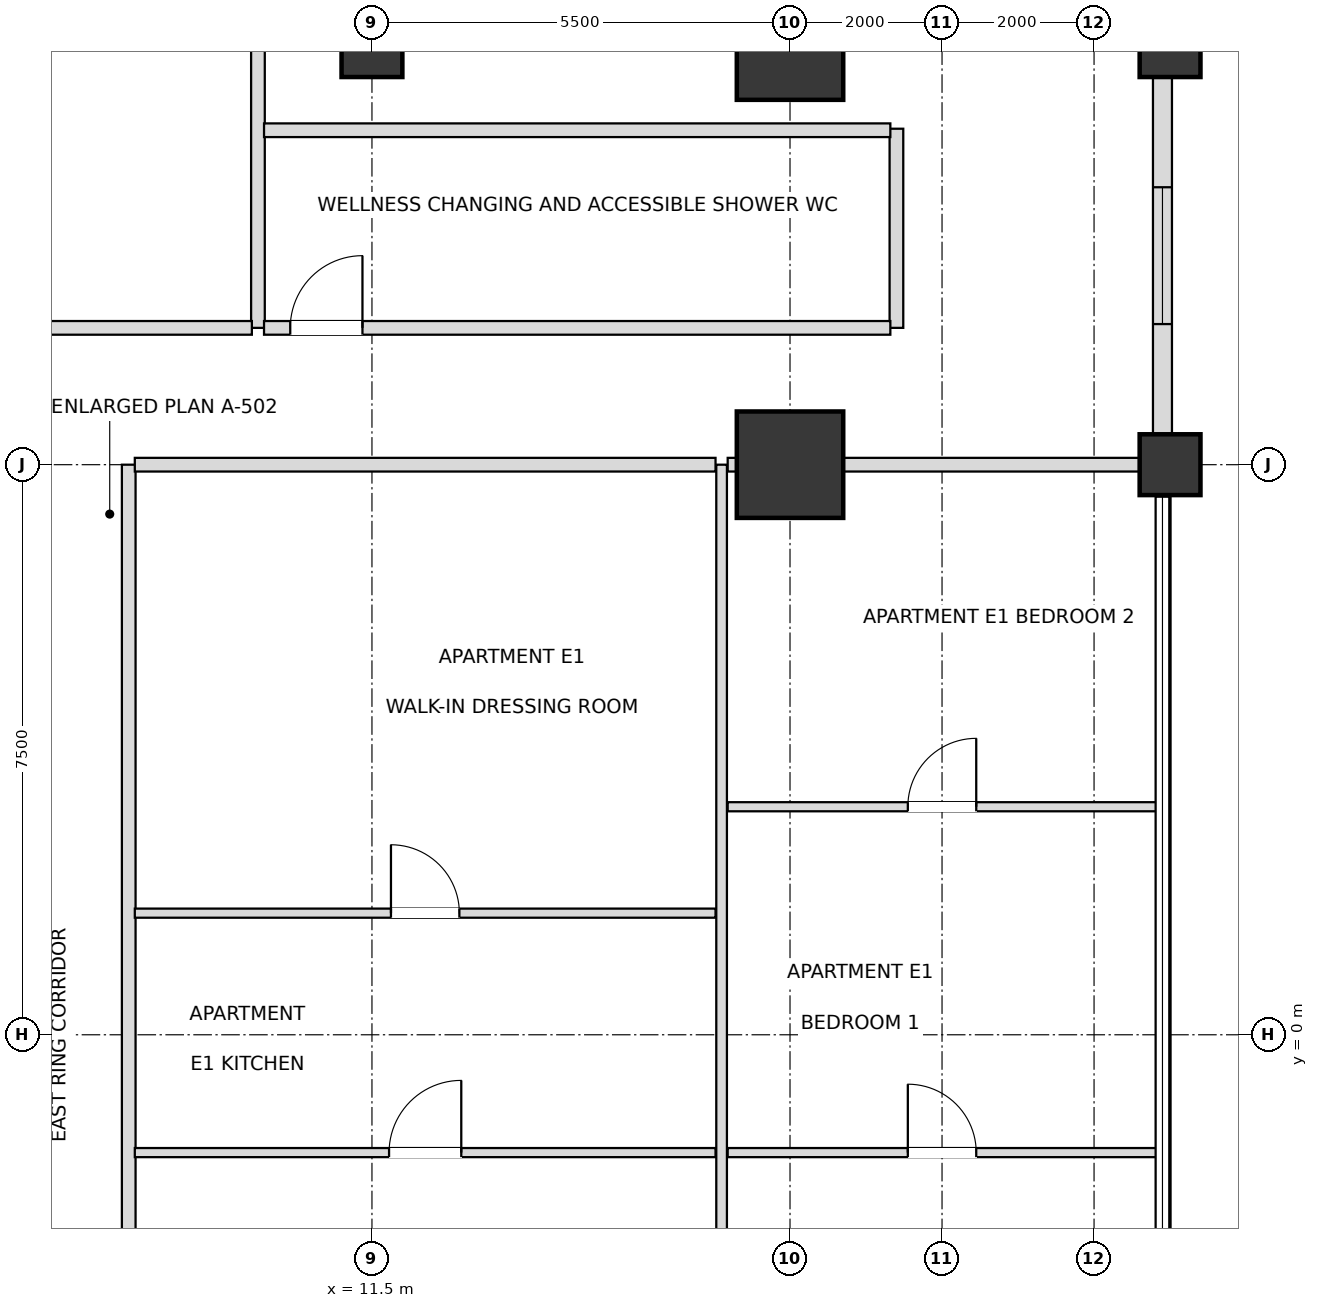
"""IFC4 building model, lengths in metres.
Left out: names, types, materials, properties, quantities, classifications, styles, units other than length and angle.
Written with IfcOpenShell. Run it as: python <this file> out.ifc"""

import sys

from ifc_helpers import new_model, si_unit, direction, frame, frame_2d, origin, origin_2d, place, context, subcontext, project, spatial, rectangle, extrude, element, fill, save


model = new_model("IFC4")
c1 = context("Model", 3, precision=1e-05, world=origin(), true_north=direction((0.0, 1.0)))
c2 = subcontext(c1, "Body", "Model", "MODEL_VIEW")
j1 = project(units=[si_unit("LENGTHUNIT", "METRE"), si_unit("PLANEANGLEUNIT", "RADIAN")], contexts=[c1])
p1 = place(None, origin())
s1 = spatial("IfcSite", under=j1, at=p1, CompositionType="ELEMENT")
p2 = place(p1, origin())
s2 = spatial("IfcBuilding", under=s1, at=p2, CompositionType="ELEMENT")
p3 = place(p2, frame((0.0, 0.0, 54.0)))
s3 = spatial("IfcBuildingStorey", under=s2, at=p3, CompositionType="ELEMENT", Elevation=54.0)
for number, where, z_axis, x_axis in (
    (1, (17.0, 7.5, 0.0), (0.0, 0.0, 1.0), (1.0, 0.0, 0.0)),
    (2, (17.0, 13.0, 0.0), (0.0, 0.0, 1.0), (1.0, 0.0, 0.0)),
):
    element("IfcColumn", number, at=place(p3, frame(where, z_axis=z_axis, x_axis=x_axis)), inside=s3, PredefinedType="USERDEFINED", context=c2, shape_type="SweptSolid", body=[
        extrude(rectangle(XDim=1.4, YDim=1.4, at=origin_2d()), origin(), (0.0, 0.0, 1.0), 3.6),
    ])
for number, where, z_axis, x_axis in (
    (3, (11.5, 13.0, 0.0), (0.0, 0.0, 1.0), (1.0, 0.0, 0.0)),
    (4, (22.0, 7.5, 0.0), (0.0, 0.0, 1.0), (1.0, 0.0, 0.0)),
    (5, (22.0, 13.0, 0.0), (0.0, 0.0, 1.0), (1.0, 0.0, 0.0)),
):
    element("IfcColumn", number, at=place(p3, frame(where, z_axis=z_axis, x_axis=x_axis)), inside=s3, PredefinedType="COLUMN", context=c2, shape_type="SweptSolid", body=[
        extrude(rectangle(XDim=0.8, YDim=0.8, at=origin_2d()), origin(), (0.0, 0.0, 1.0), 3.6),
    ])
p4 = place(p3, frame((21.9, 7.895, 0.0), z_axis=(0.0, 0.0, 1.0), x_axis=(0.0, 1.0, 0.0)))
e6 = element("IfcWall", 6, at=p4, inside=s3, PredefinedType="SOLIDWALL", context=c2, shape_type="SweptSolid", body=[
    extrude(rectangle(XDim=4.71, YDim=0.25, at=frame_2d((2.355, 0.0))), origin(), (0.0, 0.0, 1.0), 2.736),
])
p5 = place(p4, frame((1.455, 0.0, 0.72)))
e7 = element("IfcOpeningElement", 7, at=p5, cuts=e6, PredefinedType="OPENING", context=c2, shape_type="SweptSolid", body=[
    extrude(rectangle(XDim=1.8, YDim=1.68, at=frame_2d((0.9, 0.84))), frame((0.0, 0.135, 0.0), z_axis=(0.0, -1.0, 0.0), x_axis=(1.0, 0.0, 0.0)), (0.0, 0.0, 1.0), 0.27),
])
p6 = place(p3, frame((8.3, -7.5, 0.0), z_axis=(0.0, 0.0, 1.0), x_axis=(0.0, 1.0, 0.0)))
e8 = element("IfcWall", 8, at=p6, inside=s3, PredefinedType="PARTITIONING", context=c2, shape_type="SweptSolid", body=[
    extrude(rectangle(XDim=15.0, YDim=0.18, at=frame_2d((7.5, 0.0))), origin(), (0.0, 0.0, 1.0), 3.38),
])
p7 = place(p6, frame((3.475, 0.0, 0.0)))
e9 = element("IfcOpeningElement", 9, at=p7, cuts=e8, PredefinedType="OPENING", context=c2, shape_type="SweptSolid", body=[
    extrude(rectangle(XDim=0.95, YDim=2.15, at=frame_2d((0.475, 1.075))), frame((0.0, 0.1, 0.0), z_axis=(0.0, -1.0, 0.0), x_axis=(1.0, 0.0, 0.0)), (0.0, 0.0, 1.0), 0.2),
])
p8 = place(p3, frame((10.0, 9.3, 0.0), z_axis=(0.0, 0.0, 1.0), x_axis=(0.0, 1.0, 0.0)))
e10 = element("IfcWall", 10, at=p8, inside=s3, PredefinedType="PARTITIONING", context=c2, shape_type="SweptSolid", body=[
    extrude(rectangle(XDim=15.6, YDim=0.18, at=frame_2d((7.8, 0.0))), origin(), (0.0, 0.0, 1.0), 2.816),
])
p9 = place(p8, frame((8.635, 0.0, 0.0)))
e11 = element("IfcOpeningElement", 11, at=p9, cuts=e10, PredefinedType="OPENING", context=c2, shape_type="SweptSolid", body=[
    extrude(rectangle(XDim=0.95, YDim=2.15, at=frame_2d((0.475, 1.075))), frame((0.0, 0.1, 0.0), z_axis=(0.0, -1.0, 0.0), x_axis=(1.0, 0.0, 0.0)), (0.0, 0.0, 1.0), 0.2),
])
p10 = place(p3, frame((16.1, -7.5, 0.0), z_axis=(0.0, 0.0, 1.0), x_axis=(0.0, 1.0, 0.0)))
e12 = element("IfcWall", 12, at=p10, inside=s3, PredefinedType="PARTITIONING", context=c2, shape_type="SweptSolid", body=[
    extrude(rectangle(XDim=15.0, YDim=0.14, at=frame_2d((7.5, 0.0))), origin(), (0.0, 0.0, 1.0), 3.38),
])
p11 = place(p10, frame((3.475, 0.0, 0.0)))
e13 = element("IfcOpeningElement", 13, at=p11, cuts=e12, PredefinedType="OPENING", context=c2, shape_type="SweptSolid", body=[
    extrude(rectangle(XDim=0.95, YDim=2.1, at=frame_2d((0.475, 1.05))), frame((0.0, 0.08, 0.0), z_axis=(0.0, -1.0, 0.0), x_axis=(1.0, 0.0, 0.0)), (0.0, 0.0, 1.0), 0.16),
])
p12 = place(p3, frame((18.4, 9.3, 0.0), z_axis=(0.0, 0.0, 1.0), x_axis=(0.0, 1.0, 0.0)))
e14 = element("IfcWall", 14, at=p12, inside=s3, PredefinedType="PARTITIONING", context=c2, shape_type="SweptSolid", body=[
    extrude(rectangle(XDim=2.62, YDim=0.18, at=frame_2d((1.31, 0.0))), origin(), (0.0, 0.0, 1.0), 3.38),
])
p13 = place(p3, frame((8.38, -1.55, 0.0), z_axis=(0.0, 0.0, 1.0), x_axis=(1.0, 0.0, 0.0)))
e15 = element("IfcWall", 15, at=p13, inside=s3, PredefinedType="PARTITIONING", context=c2, shape_type="SweptSolid", body=[
    extrude(rectangle(XDim=7.64, YDim=0.12, at=frame_2d((3.82, 0.0))), origin(), (0.0, 0.0, 1.0), 2.948),
])
p14 = place(p13, frame((3.345, 0.0, 0.0)))
e16 = element("IfcOpeningElement", 16, at=p14, cuts=e15, PredefinedType="OPENING", context=c2, shape_type="SweptSolid", body=[
    extrude(rectangle(XDim=0.95, YDim=2.1, at=frame_2d((0.475, 1.05))), frame((0.0, 0.07, 0.0), z_axis=(0.0, -1.0, 0.0), x_axis=(1.0, 0.0, 0.0)), (0.0, 0.0, 1.0), 0.14),
])
p15 = place(p3, frame((16.18, -1.55, 0.0), z_axis=(0.0, 0.0, 1.0), x_axis=(1.0, 0.0, 0.0)))
e17 = element("IfcWall", 17, at=p15, inside=s3, PredefinedType="PARTITIONING", context=c2, shape_type="SweptSolid", body=[
    extrude(rectangle(XDim=5.64, YDim=0.12, at=frame_2d((2.82, 0.0))), origin(), (0.0, 0.0, 1.0), 2.816),
])
p16 = place(p15, frame((2.37, 0.0, 0.0)))
e18 = element("IfcOpeningElement", 18, at=p16, cuts=e17, PredefinedType="OPENING", context=c2, shape_type="SweptSolid", body=[
    extrude(rectangle(XDim=0.9, YDim=2.1, at=frame_2d((0.45, 1.05))), frame((0.0, 0.07, 0.0), z_axis=(0.0, -1.0, 0.0), x_axis=(1.0, 0.0, 0.0)), (0.0, 0.0, 1.0), 0.14),
])
p17 = place(p3, frame((8.38, 1.6, 0.0), z_axis=(0.0, 0.0, 1.0), x_axis=(1.0, 0.0, 0.0)))
e19 = element("IfcWall", 19, at=p17, inside=s3, PredefinedType="PARTITIONING", context=c2, shape_type="SweptSolid", body=[
    extrude(rectangle(XDim=7.64, YDim=0.12, at=frame_2d((3.82, 0.0))), origin(), (0.0, 0.0, 1.0), 2.948),
])
p18 = place(p17, frame((3.37, 0.0, 0.0)))
e20 = element("IfcOpeningElement", 20, at=p18, cuts=e19, PredefinedType="OPENING", context=c2, shape_type="SweptSolid", body=[
    extrude(rectangle(XDim=0.9, YDim=2.1, at=frame_2d((0.45, 1.05))), frame((0.0, 0.07, 0.0), z_axis=(0.0, -1.0, 0.0), x_axis=(1.0, 0.0, 0.0)), (0.0, 0.0, 1.0), 0.14),
])
p19 = place(p3, frame((16.18, 3.0, 0.0), z_axis=(0.0, 0.0, 1.0), x_axis=(1.0, 0.0, 0.0)))
e21 = element("IfcWall", 21, at=p19, inside=s3, PredefinedType="PARTITIONING", context=c2, shape_type="SweptSolid", body=[
    extrude(rectangle(XDim=5.64, YDim=0.12, at=frame_2d((2.82, 0.0))), origin(), (0.0, 0.0, 1.0), 2.816),
])
p20 = place(p19, frame((2.37, 0.0, 0.0)))
e22 = element("IfcOpeningElement", 22, at=p20, cuts=e21, PredefinedType="OPENING", context=c2, shape_type="SweptSolid", body=[
    extrude(rectangle(XDim=0.9, YDim=2.1, at=frame_2d((0.45, 1.05))), frame((0.0, 0.07, 0.0), z_axis=(0.0, -1.0, 0.0), x_axis=(1.0, 0.0, 0.0)), (0.0, 0.0, 1.0), 0.14),
])
p21 = place(p3, frame((8.38, 7.5, 0.0), z_axis=(0.0, 0.0, 1.0), x_axis=(1.0, 0.0, 0.0)))
e23 = element("IfcWall", 23, at=p21, inside=s3, PredefinedType="PARTITIONING", context=c2, shape_type="SweptSolid", body=[
    extrude(rectangle(XDim=7.64, YDim=0.18, at=frame_2d((3.82, 0.0))), origin(), (0.0, 0.0, 1.0), 2.816),
])
p22 = place(p3, frame((16.18, 7.5, 0.0), z_axis=(0.0, 0.0, 1.0), x_axis=(1.0, 0.0, 0.0)))
e24 = element("IfcWall", 24, at=p22, inside=s3, PredefinedType="PARTITIONING", context=c2, shape_type="SweptSolid", body=[
    extrude(rectangle(XDim=5.72, YDim=0.18, at=frame_2d((2.86, 0.0))), origin(), (0.0, 0.0, 1.0), 2.816),
])
p23 = place(p3, frame((-2.87, 9.3, 0.0), z_axis=(0.0, 0.0, 1.0), x_axis=(1.0, 0.0, 0.0)))
e25 = element("IfcWall", 25, at=p23, inside=s3, PredefinedType="PARTITIONING", context=c2, shape_type="SweptSolid", body=[
    extrude(rectangle(XDim=12.79, YDim=0.18, at=frame_2d((6.395, 0.0))), origin(), (0.0, 0.0, 1.0), 2.816),
])
p24 = place(p23, frame((5.925, 0.0, 0.0)))
e26 = element("IfcOpeningElement", 26, at=p24, cuts=e25, PredefinedType="OPENING", context=c2, shape_type="SweptSolid", body=[
    extrude(rectangle(XDim=0.95, YDim=2.15, at=frame_2d((0.475, 1.075))), frame((0.0, 0.1, 0.0), z_axis=(0.0, -1.0, 0.0), x_axis=(1.0, 0.0, 0.0)), (0.0, 0.0, 1.0), 0.2),
])
p25 = place(p3, frame((10.08, 9.3, 0.0), z_axis=(0.0, 0.0, 1.0), x_axis=(1.0, 0.0, 0.0)))
e27 = element("IfcWall", 27, at=p25, inside=s3, PredefinedType="PARTITIONING", context=c2, shape_type="SweptSolid", body=[
    extrude(rectangle(XDim=8.24, YDim=0.18, at=frame_2d((4.12, 0.0))), origin(), (0.0, 0.0, 1.0), 2.816),
])
p26 = place(p25, frame((0.345, 0.0, 0.0)))
e28 = element("IfcOpeningElement", 28, at=p26, cuts=e27, PredefinedType="OPENING", context=c2, shape_type="SweptSolid", body=[
    extrude(rectangle(XDim=0.95, YDim=2.15, at=frame_2d((0.475, 1.075))), frame((0.0, 0.1, 0.0), z_axis=(0.0, -1.0, 0.0), x_axis=(1.0, 0.0, 0.0)), (0.0, 0.0, 1.0), 0.2),
])
p27 = place(p3, frame((10.08, 11.9, 0.0), z_axis=(0.0, 0.0, 1.0), x_axis=(1.0, 0.0, 0.0)))
e29 = element("IfcWall", 29, at=p27, inside=s3, PredefinedType="PARTITIONING", context=c2, shape_type="SweptSolid", body=[
    extrude(rectangle(XDim=8.24, YDim=0.18, at=frame_2d((4.12, 0.0))), origin(), (0.0, 0.0, 1.0), 2.816),
])
p28 = place(p5, origin())
e30 = element("IfcWindow", 30, at=p28, inside=s3, PartitioningType="SINGLE_PANEL", PredefinedType="WINDOW", context=c2, shape_type="SweptSolid", body=[
    extrude(rectangle(XDim=1.8, YDim=1.68, at=frame_2d((0.9, 0.84))), frame((0.0, 0.03, 0.0), z_axis=(0.0, -1.0, 0.0), x_axis=(1.0, 0.0, 0.0)), (0.0, 0.0, 1.0), 0.06),
])
fill(e7, e30)
p29 = place(p26, origin())
e31 = element("IfcDoor", 31, at=p29, inside=s3, OperationType="SINGLE_SWING_RIGHT", PredefinedType="DOOR", context=c2, shape_type="SweptSolid", body=[
    extrude(rectangle(XDim=0.95, YDim=2.15, at=frame_2d((0.475, 1.075))), frame((0.0, 0.025, 0.0), z_axis=(0.0, -1.0, 0.0), x_axis=(1.0, 0.0, 0.0)), (0.0, 0.0, 1.0), 0.05),
])
fill(e28, e31)
p30 = place(p14, origin())
e32 = element("IfcDoor", 32, at=p30, inside=s3, OperationType="SINGLE_SWING_RIGHT", PredefinedType="DOOR", context=c2, shape_type="SweptSolid", body=[
    extrude(rectangle(XDim=0.95, YDim=2.1, at=frame_2d((0.475, 1.05))), frame((0.0, 0.025, 0.0), z_axis=(0.0, -1.0, 0.0), x_axis=(1.0, 0.0, 0.0)), (0.0, 0.0, 1.0), 0.05),
])
fill(e16, e32)
p31 = place(p18, origin())
e33 = element("IfcDoor", 33, at=p31, inside=s3, OperationType="SINGLE_SWING_LEFT", PredefinedType="DOOR", context=c2, shape_type="SweptSolid", body=[
    extrude(rectangle(XDim=0.9, YDim=2.1, at=frame_2d((0.45, 1.05))), frame((0.0, 0.025, 0.0), z_axis=(0.0, -1.0, 0.0), x_axis=(1.0, 0.0, 0.0)), (0.0, 0.0, 1.0), 0.05),
])
fill(e20, e33)
p32 = place(p16, origin())
e34 = element("IfcDoor", 34, at=p32, inside=s3, OperationType="SINGLE_SWING_LEFT", PredefinedType="DOOR", context=c2, shape_type="SweptSolid", body=[
    extrude(rectangle(XDim=0.9, YDim=2.1, at=frame_2d((0.45, 1.05))), frame((0.0, 0.025, 0.0), z_axis=(0.0, -1.0, 0.0), x_axis=(1.0, 0.0, 0.0)), (0.0, 0.0, 1.0), 0.05),
])
fill(e18, e34)
p33 = place(p20, origin())
e35 = element("IfcDoor", 35, at=p33, inside=s3, OperationType="SINGLE_SWING_RIGHT", PredefinedType="DOOR", context=c2, shape_type="SweptSolid", body=[
    extrude(rectangle(XDim=0.9, YDim=2.1, at=frame_2d((0.45, 1.05))), frame((0.0, 0.025, 0.0), z_axis=(0.0, -1.0, 0.0), x_axis=(1.0, 0.0, 0.0)), (0.0, 0.0, 1.0), 0.05),
])
fill(e22, e35)
save(model, sys.argv[1])
